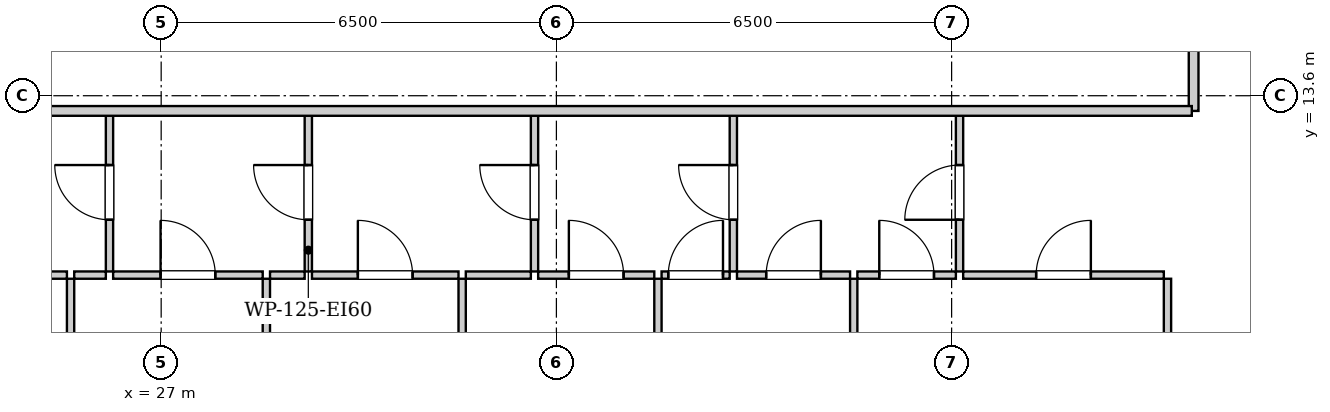
"""IFC4 building model, lengths in metres.
Left out: names, types, materials, properties, quantities, classifications, styles, units other than length and angle.
Written with IfcOpenShell. Run it as: python <this file> out.ifc"""

import sys

from ifc_helpers import new_model, si_unit, direction, frame, frame_2d, origin, place, context, subcontext, project, spatial, rectangle, extrude, element, fill, save


model = new_model("IFC4")
c1 = context("Model", 3, precision=1e-05, world=origin(), true_north=direction((0.0, 1.0)))
c2 = subcontext(c1, "Body", "Model", "MODEL_VIEW")
j1 = project(units=[si_unit("LENGTHUNIT", "METRE"), si_unit("PLANEANGLEUNIT", "RADIAN")], contexts=[c1])
p1 = place(None, origin())
s1 = spatial("IfcSite", under=j1, at=p1, CompositionType="ELEMENT")
p2 = place(p1, origin())
s2 = spatial("IfcBuilding", under=s1, at=p2, CompositionType="ELEMENT")
p3 = place(p2, frame((0.0, 0.0, 45.0)))
s3 = spatial("IfcBuildingStorey", under=s2, at=p3, CompositionType="ELEMENT", Elevation=45.0)
p4 = place(p3, frame((43.98, 13.35, 0.0), z_axis=(0.0, 0.0, 1.0), x_axis=(0.0, 1.0, 0.0)))
e1 = element("IfcWall", 1, at=p4, inside=s3, PredefinedType="PARTITIONING", context=c2, shape_type="SweptSolid", body=[
    extrude(rectangle(XDim=1.74, YDim=0.16, at=frame_2d((0.87, 0.0))), origin(), (0.0, 0.0, 1.0), 2.94),
])
p5 = place(p3, frame((26.15, 10.71, 0.0), z_axis=(0.0, 0.0, 1.0), x_axis=(0.0, 1.0, 0.0)))
e2 = element("IfcWall", 2, at=p5, inside=s3, PredefinedType="PARTITIONING", context=c2, shape_type="SweptSolid", body=[
    extrude(rectangle(XDim=2.6, YDim=0.12, at=frame_2d((1.3, 0.0))), origin(), (0.0, 0.0, 1.0), 2.94),
])
p6 = place(p5, frame((0.85, 0.0, 0.0)))
e3 = element("IfcOpeningElement", 3, at=p6, cuts=e2, PredefinedType="OPENING", context=c2, shape_type="SweptSolid", body=[
    extrude(rectangle(XDim=0.9, YDim=2.05, at=frame_2d((0.45, 1.025))), frame((0.0, 0.07, 0.0), z_axis=(0.0, -1.0, 0.0), x_axis=(1.0, 0.0, 0.0)), (0.0, 0.0, 1.0), 0.14),
])
p7 = place(p3, frame((22.35, 10.65, 0.0), z_axis=(0.0, 0.0, 1.0), x_axis=(1.0, 0.0, 0.0)))
e4 = element("IfcWall", 4, at=p7, inside=s3, PredefinedType="PARTITIONING", context=c2, shape_type="SweptSolid", body=[
    extrude(rectangle(XDim=3.1, YDim=0.12, at=frame_2d((1.55, 0.0))), origin(), (0.0, 0.0, 1.0), 2.94),
])
p8 = place(p7, frame((1.1, 0.0, 0.0)))
e5 = element("IfcOpeningElement", 5, at=p8, cuts=e4, PredefinedType="OPENING", context=c2, shape_type="SweptSolid", body=[
    extrude(rectangle(XDim=0.9, YDim=2.05, at=frame_2d((0.45, 1.025))), frame((0.0, 0.07, 0.0), z_axis=(0.0, -1.0, 0.0), x_axis=(1.0, 0.0, 0.0)), (0.0, 0.0, 1.0), 0.14),
])
p9 = place(p3, frame((25.57, 10.65, 0.0), z_axis=(0.0, 0.0, 1.0), x_axis=(1.0, 0.0, 0.0)))
e6 = element("IfcWall", 6, at=p9, inside=s3, PredefinedType="PARTITIONING", context=c2, shape_type="SweptSolid", body=[
    extrude(rectangle(XDim=0.52, YDim=0.12, at=frame_2d((0.26, 0.0))), origin(), (0.0, 0.0, 1.0), 2.94),
])
p10 = place(p3, frame((29.42, 10.71, 0.0), z_axis=(0.0, 0.0, 1.0), x_axis=(0.0, 1.0, 0.0)))
e7 = element("IfcWall", 7, at=p10, inside=s3, PredefinedType="PARTITIONING", context=c2, shape_type="SweptSolid", body=[
    extrude(rectangle(XDim=2.6, YDim=0.12, at=frame_2d((1.3, 0.0))), origin(), (0.0, 0.0, 1.0), 2.94),
])
p11 = place(p10, frame((0.85, 0.0, 0.0)))
e8 = element("IfcOpeningElement", 8, at=p11, cuts=e7, PredefinedType="OPENING", context=c2, shape_type="SweptSolid", body=[
    extrude(rectangle(XDim=0.9, YDim=2.05, at=frame_2d((0.45, 1.025))), frame((0.0, 0.07, 0.0), z_axis=(0.0, -1.0, 0.0), x_axis=(1.0, 0.0, 0.0)), (0.0, 0.0, 1.0), 0.14),
])
p12 = place(p3, frame((26.21, 10.65, 0.0), z_axis=(0.0, 0.0, 1.0), x_axis=(1.0, 0.0, 0.0)))
e9 = element("IfcWall", 9, at=p12, inside=s3, PredefinedType="PARTITIONING", context=c2, shape_type="SweptSolid", body=[
    extrude(rectangle(XDim=2.46, YDim=0.12, at=frame_2d((1.23, 0.0))), origin(), (0.0, 0.0, 1.0), 2.94),
])
p13 = place(p12, frame((0.78, 0.0, 0.0)))
e10 = element("IfcOpeningElement", 10, at=p13, cuts=e9, PredefinedType="OPENING", context=c2, shape_type="SweptSolid", body=[
    extrude(rectangle(XDim=0.9, YDim=2.05, at=frame_2d((0.45, 1.025))), frame((0.0, 0.07, 0.0), z_axis=(0.0, -1.0, 0.0), x_axis=(1.0, 0.0, 0.0)), (0.0, 0.0, 1.0), 0.14),
])
p14 = place(p3, frame((28.79, 10.65, 0.0), z_axis=(0.0, 0.0, 1.0), x_axis=(1.0, 0.0, 0.0)))
e11 = element("IfcWall", 11, at=p14, inside=s3, PredefinedType="PARTITIONING", context=c2, shape_type="SweptSolid", body=[
    extrude(rectangle(XDim=0.57, YDim=0.12, at=frame_2d((0.285, 0.0))), origin(), (0.0, 0.0, 1.0), 2.94),
])
p15 = place(p3, frame((33.14, 10.71, 0.0), z_axis=(0.0, 0.0, 1.0), x_axis=(0.0, 1.0, 0.0)))
e12 = element("IfcWall", 12, at=p15, inside=s3, PredefinedType="PARTITIONING", context=c2, shape_type="SweptSolid", body=[
    extrude(rectangle(XDim=2.6, YDim=0.12, at=frame_2d((1.3, 0.0))), origin(), (0.0, 0.0, 1.0), 2.155),
])
p16 = place(p15, frame((0.85, 0.0, 0.0)))
e13 = element("IfcOpeningElement", 13, at=p16, cuts=e12, PredefinedType="OPENING", context=c2, shape_type="SweptSolid", body=[
    extrude(rectangle(XDim=0.9, YDim=2.05, at=frame_2d((0.45, 1.025))), frame((0.0, 0.07, 0.0), z_axis=(0.0, -1.0, 0.0), x_axis=(1.0, 0.0, 0.0)), (0.0, 0.0, 1.0), 0.14),
])
p17 = place(p3, frame((29.48, 10.65, 0.0), z_axis=(0.0, 0.0, 1.0), x_axis=(1.0, 0.0, 0.0)))
e14 = element("IfcWall", 14, at=p17, inside=s3, PredefinedType="PARTITIONING", context=c2, shape_type="SweptSolid", body=[
    extrude(rectangle(XDim=2.41, YDim=0.12, at=frame_2d((1.205, 0.0))), origin(), (0.0, 0.0, 1.0), 2.94),
])
p18 = place(p17, frame((0.755, 0.0, 0.0)))
e15 = element("IfcOpeningElement", 15, at=p18, cuts=e14, PredefinedType="OPENING", context=c2, shape_type="SweptSolid", body=[
    extrude(rectangle(XDim=0.9, YDim=2.05, at=frame_2d((0.45, 1.025))), frame((0.0, 0.07, 0.0), z_axis=(0.0, -1.0, 0.0), x_axis=(1.0, 0.0, 0.0)), (0.0, 0.0, 1.0), 0.14),
])
p19 = place(p3, frame((32.01, 10.65, 0.0), z_axis=(0.0, 0.0, 1.0), x_axis=(1.0, 0.0, 0.0)))
e16 = element("IfcWall", 16, at=p19, inside=s3, PredefinedType="PARTITIONING", context=c2, shape_type="SweptSolid", body=[
    extrude(rectangle(XDim=1.07, YDim=0.12, at=frame_2d((0.535, 0.0))), origin(), (0.0, 0.0, 1.0), 2.94),
])
p20 = place(p3, frame((36.41, 10.71, 0.0), z_axis=(0.0, 0.0, 1.0), x_axis=(0.0, 1.0, 0.0)))
e17 = element("IfcWall", 17, at=p20, inside=s3, PredefinedType="PARTITIONING", context=c2, shape_type="SweptSolid", body=[
    extrude(rectangle(XDim=2.6, YDim=0.12, at=frame_2d((1.3, 0.0))), origin(), (0.0, 0.0, 1.0), 2.94),
])
p21 = place(p20, frame((0.85, 0.0, 0.0)))
e18 = element("IfcOpeningElement", 18, at=p21, cuts=e17, PredefinedType="OPENING", context=c2, shape_type="SweptSolid", body=[
    extrude(rectangle(XDim=0.9, YDim=2.05, at=frame_2d((0.45, 1.025))), frame((0.0, 0.07, 0.0), z_axis=(0.0, -1.0, 0.0), x_axis=(1.0, 0.0, 0.0)), (0.0, 0.0, 1.0), 0.14),
])
p22 = place(p3, frame((33.2, 10.65, 0.0), z_axis=(0.0, 0.0, 1.0), x_axis=(1.0, 0.0, 0.0)))
e19 = element("IfcWall", 19, at=p22, inside=s3, PredefinedType="PARTITIONING", context=c2, shape_type="SweptSolid", body=[
    extrude(rectangle(XDim=1.91, YDim=0.12, at=frame_2d((0.955, 0.0))), origin(), (0.0, 0.0, 1.0), 2.94),
])
p23 = place(p22, frame((0.505, 0.0, 0.0)))
e20 = element("IfcOpeningElement", 20, at=p23, cuts=e19, PredefinedType="OPENING", context=c2, shape_type="SweptSolid", body=[
    extrude(rectangle(XDim=0.9, YDim=2.05, at=frame_2d((0.45, 1.025))), frame((0.0, 0.07, 0.0), z_axis=(0.0, -1.0, 0.0), x_axis=(1.0, 0.0, 0.0)), (0.0, 0.0, 1.0), 0.14),
])
p24 = place(p3, frame((35.23, 10.65, 0.0), z_axis=(0.0, 0.0, 1.0), x_axis=(1.0, 0.0, 0.0)))
e21 = element("IfcWall", 21, at=p24, inside=s3, PredefinedType="PARTITIONING", context=c2, shape_type="SweptSolid", body=[
    extrude(rectangle(XDim=1.12, YDim=0.12, at=frame_2d((0.56, 0.0))), origin(), (0.0, 0.0, 1.0), 2.94),
])
p25 = place(p24, frame((0.11, 0.0, 0.0)))
e22 = element("IfcOpeningElement", 22, at=p25, cuts=e21, PredefinedType="OPENING", context=c2, shape_type="SweptSolid", body=[
    extrude(rectangle(XDim=0.9, YDim=2.05, at=frame_2d((0.45, 1.025))), frame((0.0, 0.07, 0.0), z_axis=(0.0, -1.0, 0.0), x_axis=(1.0, 0.0, 0.0)), (0.0, 0.0, 1.0), 0.14),
])
p26 = place(p3, frame((40.13, 10.71, 0.0), z_axis=(0.0, 0.0, 1.0), x_axis=(0.0, 1.0, 0.0)))
e23 = element("IfcWall", 23, at=p26, inside=s3, PredefinedType="PARTITIONING", context=c2, shape_type="SweptSolid", body=[
    extrude(rectangle(XDim=2.6, YDim=0.12, at=frame_2d((1.3, 0.0))), origin(), (0.0, 0.0, 1.0), 2.94),
])
p27 = place(p26, frame((0.85, 0.0, 0.0)))
e24 = element("IfcOpeningElement", 24, at=p27, cuts=e23, PredefinedType="OPENING", context=c2, shape_type="SweptSolid", body=[
    extrude(rectangle(XDim=0.9, YDim=2.05, at=frame_2d((0.45, 1.025))), frame((0.0, 0.07, 0.0), z_axis=(0.0, -1.0, 0.0), x_axis=(1.0, 0.0, 0.0)), (0.0, 0.0, 1.0), 0.14),
])
p28 = place(p3, frame((36.47, 10.65, 0.0), z_axis=(0.0, 0.0, 1.0), x_axis=(1.0, 0.0, 0.0)))
e25 = element("IfcWall", 25, at=p28, inside=s3, PredefinedType="PARTITIONING", context=c2, shape_type="SweptSolid", body=[
    extrude(rectangle(XDim=1.86, YDim=0.12, at=frame_2d((0.93, 0.0))), origin(), (0.0, 0.0, 1.0), 2.94),
])
p29 = place(p28, frame((0.48, 0.0, 0.0)))
e26 = element("IfcOpeningElement", 26, at=p29, cuts=e25, PredefinedType="OPENING", context=c2, shape_type="SweptSolid", body=[
    extrude(rectangle(XDim=0.9, YDim=2.05, at=frame_2d((0.45, 1.025))), frame((0.0, 0.07, 0.0), z_axis=(0.0, -1.0, 0.0), x_axis=(1.0, 0.0, 0.0)), (0.0, 0.0, 1.0), 0.14),
])
p30 = place(p3, frame((38.45, 10.65, 0.0), z_axis=(0.0, 0.0, 1.0), x_axis=(1.0, 0.0, 0.0)))
e27 = element("IfcWall", 27, at=p30, inside=s3, PredefinedType="PARTITIONING", context=c2, shape_type="SweptSolid", body=[
    extrude(rectangle(XDim=1.62, YDim=0.12, at=frame_2d((0.81, 0.0))), origin(), (0.0, 0.0, 1.0), 2.94),
])
p31 = place(p30, frame((0.36, 0.0, 0.0)))
e28 = element("IfcOpeningElement", 28, at=p31, cuts=e27, PredefinedType="OPENING", context=c2, shape_type="SweptSolid", body=[
    extrude(rectangle(XDim=0.9, YDim=2.05, at=frame_2d((0.45, 1.025))), frame((0.0, 0.07, 0.0), z_axis=(0.0, -1.0, 0.0), x_axis=(1.0, 0.0, 0.0)), (0.0, 0.0, 1.0), 0.14),
])
p32 = place(p3, frame((40.19, 10.65, 0.0), z_axis=(0.0, 0.0, 1.0), x_axis=(1.0, 0.0, 0.0)))
e29 = element("IfcWall", 29, at=p32, inside=s3, PredefinedType="PARTITIONING", context=c2, shape_type="SweptSolid", body=[
    extrude(rectangle(XDim=3.3, YDim=0.12, at=frame_2d((1.65, 0.0))), origin(), (0.0, 0.0, 1.0), 2.94),
])
p33 = place(p32, frame((1.2, 0.0, 0.0)))
e30 = element("IfcOpeningElement", 30, at=p33, cuts=e29, PredefinedType="OPENING", context=c2, shape_type="SweptSolid", body=[
    extrude(rectangle(XDim=0.9, YDim=2.05, at=frame_2d((0.45, 1.025))), frame((0.0, 0.07, 0.0), z_axis=(0.0, -1.0, 0.0), x_axis=(1.0, 0.0, 0.0)), (0.0, 0.0, 1.0), 0.14),
])
p34 = place(p3, frame((25.51, 0.28, 0.0), z_axis=(0.0, 0.0, 1.0), x_axis=(0.0, 1.0, 0.0)))
e31 = element("IfcWall", 31, at=p34, inside=s3, PredefinedType="PARTITIONING", context=c2, shape_type="SweptSolid", body=[
    extrude(rectangle(XDim=10.31, YDim=0.12, at=frame_2d((5.155, 0.0))), origin(), (0.0, 0.0, 1.0), 2.94),
])
p35 = place(p34, frame((4.69, 0.0, 0.0)))
e32 = element("IfcOpeningElement", 32, at=p35, cuts=e31, PredefinedType="OPENING", context=c2, shape_type="SweptSolid", body=[
    extrude(rectangle(XDim=0.9, YDim=2.05, at=frame_2d((0.45, 1.025))), frame((0.0, 0.07, 0.0), z_axis=(0.0, -1.0, 0.0), x_axis=(1.0, 0.0, 0.0)), (0.0, 0.0, 1.0), 0.14),
])
p36 = place(p3, frame((28.73, 0.28, 0.0), z_axis=(0.0, 0.0, 1.0), x_axis=(0.0, 1.0, 0.0)))
e33 = element("IfcWall", 33, at=p36, inside=s3, PredefinedType="PARTITIONING", context=c2, shape_type="SweptSolid", body=[
    extrude(rectangle(XDim=10.31, YDim=0.12, at=frame_2d((5.155, 0.0))), origin(), (0.0, 0.0, 1.0), 2.94),
])
p37 = place(p36, frame((4.69, 0.0, 0.0)))
e34 = element("IfcOpeningElement", 34, at=p37, cuts=e33, PredefinedType="OPENING", context=c2, shape_type="SweptSolid", body=[
    extrude(rectangle(XDim=0.9, YDim=2.05, at=frame_2d((0.45, 1.025))), frame((0.0, 0.07, 0.0), z_axis=(0.0, -1.0, 0.0), x_axis=(1.0, 0.0, 0.0)), (0.0, 0.0, 1.0), 0.14),
])
p38 = place(p3, frame((31.95, 0.28, 0.0), z_axis=(0.0, 0.0, 1.0), x_axis=(0.0, 1.0, 0.0)))
e35 = element("IfcWall", 35, at=p38, inside=s3, PredefinedType="PARTITIONING", context=c2, shape_type="SweptSolid", body=[
    extrude(rectangle(XDim=10.31, YDim=0.12, at=frame_2d((5.155, 0.0))), origin(), (0.0, 0.0, 1.0), 2.94),
])
p39 = place(p38, frame((4.69, 0.0, 0.0)))
e36 = element("IfcOpeningElement", 36, at=p39, cuts=e35, PredefinedType="OPENING", context=c2, shape_type="SweptSolid", body=[
    extrude(rectangle(XDim=0.9, YDim=2.05, at=frame_2d((0.45, 1.025))), frame((0.0, 0.07, 0.0), z_axis=(0.0, -1.0, 0.0), x_axis=(1.0, 0.0, 0.0)), (0.0, 0.0, 1.0), 0.14),
])
p40 = place(p3, frame((35.17, 0.28, 0.0), z_axis=(0.0, 0.0, 1.0), x_axis=(0.0, 1.0, 0.0)))
e37 = element("IfcWall", 37, at=p40, inside=s3, PredefinedType="PARTITIONING", context=c2, shape_type="SweptSolid", body=[
    extrude(rectangle(XDim=10.31, YDim=0.12, at=frame_2d((5.155, 0.0))), origin(), (0.0, 0.0, 1.0), 2.94),
])
p41 = place(p40, frame((4.69, 0.0, 0.0)))
e38 = element("IfcOpeningElement", 38, at=p41, cuts=e37, PredefinedType="OPENING", context=c2, shape_type="SweptSolid", body=[
    extrude(rectangle(XDim=0.9, YDim=2.05, at=frame_2d((0.45, 1.025))), frame((0.0, 0.07, 0.0), z_axis=(0.0, -1.0, 0.0), x_axis=(1.0, 0.0, 0.0)), (0.0, 0.0, 1.0), 0.14),
])
p42 = place(p3, frame((38.39, 0.28, 0.0), z_axis=(0.0, 0.0, 1.0), x_axis=(0.0, 1.0, 0.0)))
e39 = element("IfcWall", 39, at=p42, inside=s3, PredefinedType="PARTITIONING", context=c2, shape_type="SweptSolid", body=[
    extrude(rectangle(XDim=10.31, YDim=0.12, at=frame_2d((5.155, 0.0))), origin(), (0.0, 0.0, 1.0), 2.94),
])
p43 = place(p42, frame((4.69, 0.0, 0.0)))
e40 = element("IfcOpeningElement", 40, at=p43, cuts=e39, PredefinedType="OPENING", context=c2, shape_type="SweptSolid", body=[
    extrude(rectangle(XDim=0.9, YDim=2.05, at=frame_2d((0.45, 1.025))), frame((0.0, 0.07, 0.0), z_axis=(0.0, -1.0, 0.0), x_axis=(1.0, 0.0, 0.0)), (0.0, 0.0, 1.0), 0.14),
])
p44 = place(p3, frame((43.55, 0.28, 0.0), z_axis=(0.0, 0.0, 1.0), x_axis=(0.0, 1.0, 0.0)))
e41 = element("IfcWall", 41, at=p44, inside=s3, PredefinedType="PARTITIONING", context=c2, shape_type="SweptSolid", body=[
    extrude(rectangle(XDim=10.31, YDim=0.12, at=frame_2d((5.155, 0.0))), origin(), (0.0, 0.0, 1.0), 2.94),
])
p45 = place(p44, frame((4.69, 0.0, 0.0)))
e42 = element("IfcOpeningElement", 42, at=p45, cuts=e41, PredefinedType="OPENING", context=c2, shape_type="SweptSolid", body=[
    extrude(rectangle(XDim=0.9, YDim=2.05, at=frame_2d((0.45, 1.025))), frame((0.0, 0.07, 0.0), z_axis=(0.0, -1.0, 0.0), x_axis=(1.0, 0.0, 0.0)), (0.0, 0.0, 1.0), 0.14),
])
p46 = place(p3, frame((10.05, 13.35, 0.0), z_axis=(0.0, 0.0, 1.0), x_axis=(1.0, 0.0, 0.0)))
e43 = element("IfcWall", 43, at=p46, inside=s3, PredefinedType="PARTITIONING", context=c2, shape_type="SweptSolid", body=[
    extrude(rectangle(XDim=33.9, YDim=0.16, at=frame_2d((16.95, 0.0))), origin(), (0.0, 0.0, 1.0), 2.94),
])
p47 = place(p46, frame((3.8, 0.0, 0.0)))
e44 = element("IfcOpeningElement", 44, at=p47, cuts=e43, PredefinedType="OPENING", context=c2, shape_type="SweptSolid", body=[
    extrude(rectangle(XDim=0.95, YDim=2.1, at=frame_2d((0.475, 1.05))), frame((0.0, 0.09, 0.0), z_axis=(0.0, -1.0, 0.0), x_axis=(1.0, 0.0, 0.0)), (0.0, 0.0, 1.0), 0.18),
])
p48 = place(p46, frame((13.345, 0.0, 0.0)))
e45 = element("IfcOpeningElement", 45, at=p48, cuts=e43, PredefinedType="OPENING", context=c2, shape_type="SweptSolid", body=[
    extrude(rectangle(XDim=0.95, YDim=2.1, at=frame_2d((0.475, 1.05))), frame((0.0, 0.09, 0.0), z_axis=(0.0, -1.0, 0.0), x_axis=(1.0, 0.0, 0.0)), (0.0, 0.0, 1.0), 0.18),
])
p49 = place(p6, origin())
e46 = element("IfcDoor", 46, at=p49, inside=s3, OperationType="SINGLE_SWING_RIGHT", PredefinedType="DOOR", context=c2, shape_type="SweptSolid", body=[
    extrude(rectangle(XDim=0.9, YDim=2.05, at=frame_2d((0.45, 1.025))), frame((0.0, 0.025, 0.0), z_axis=(0.0, -1.0, 0.0), x_axis=(1.0, 0.0, 0.0)), (0.0, 0.0, 1.0), 0.05),
])
fill(e3, e46)
p50 = place(p11, origin())
e47 = element("IfcDoor", 47, at=p50, inside=s3, OperationType="SINGLE_SWING_RIGHT", PredefinedType="DOOR", context=c2, shape_type="SweptSolid", body=[
    extrude(rectangle(XDim=0.9, YDim=2.05, at=frame_2d((0.45, 1.025))), frame((0.0, 0.025, 0.0), z_axis=(0.0, -1.0, 0.0), x_axis=(1.0, 0.0, 0.0)), (0.0, 0.0, 1.0), 0.05),
])
fill(e8, e47)
p51 = place(p13, origin())
e48 = element("IfcDoor", 48, at=p51, inside=s3, OperationType="SINGLE_SWING_LEFT", PredefinedType="DOOR", context=c2, shape_type="SweptSolid", body=[
    extrude(rectangle(XDim=0.9, YDim=2.05, at=frame_2d((0.45, 1.025))), frame((0.0, 0.025, 0.0), z_axis=(0.0, -1.0, 0.0), x_axis=(1.0, 0.0, 0.0)), (0.0, 0.0, 1.0), 0.05),
])
fill(e10, e48)
p52 = place(p16, origin())
e49 = element("IfcDoor", 49, at=p52, inside=s3, OperationType="SINGLE_SWING_RIGHT", PredefinedType="DOOR", context=c2, shape_type="SweptSolid", body=[
    extrude(rectangle(XDim=0.9, YDim=2.05, at=frame_2d((0.45, 1.025))), frame((0.0, 0.025, 0.0), z_axis=(0.0, -1.0, 0.0), x_axis=(1.0, 0.0, 0.0)), (0.0, 0.0, 1.0), 0.05),
])
fill(e13, e49)
p53 = place(p18, origin())
e50 = element("IfcDoor", 50, at=p53, inside=s3, OperationType="SINGLE_SWING_LEFT", PredefinedType="DOOR", context=c2, shape_type="SweptSolid", body=[
    extrude(rectangle(XDim=0.9, YDim=2.05, at=frame_2d((0.45, 1.025))), frame((0.0, 0.025, 0.0), z_axis=(0.0, -1.0, 0.0), x_axis=(1.0, 0.0, 0.0)), (0.0, 0.0, 1.0), 0.05),
])
fill(e15, e50)
p54 = place(p21, origin())
e51 = element("IfcDoor", 51, at=p54, inside=s3, OperationType="SINGLE_SWING_RIGHT", PredefinedType="DOOR", context=c2, shape_type="SweptSolid", body=[
    extrude(rectangle(XDim=0.9, YDim=2.05, at=frame_2d((0.45, 1.025))), frame((0.0, 0.025, 0.0), z_axis=(0.0, -1.0, 0.0), x_axis=(1.0, 0.0, 0.0)), (0.0, 0.0, 1.0), 0.05),
])
fill(e18, e51)
p55 = place(p23, origin())
e52 = element("IfcDoor", 52, at=p55, inside=s3, OperationType="SINGLE_SWING_LEFT", PredefinedType="DOOR", context=c2, shape_type="SweptSolid", body=[
    extrude(rectangle(XDim=0.9, YDim=2.05, at=frame_2d((0.45, 1.025))), frame((0.0, 0.025, 0.0), z_axis=(0.0, -1.0, 0.0), x_axis=(1.0, 0.0, 0.0)), (0.0, 0.0, 1.0), 0.05),
])
fill(e20, e52)
p56 = place(p25, origin())
e53 = element("IfcDoor", 53, at=p56, inside=s3, OperationType="SINGLE_SWING_RIGHT", PredefinedType="DOOR", context=c2, shape_type="SweptSolid", body=[
    extrude(rectangle(XDim=0.9, YDim=2.05, at=frame_2d((0.45, 1.025))), frame((0.0, 0.025, 0.0), z_axis=(0.0, -1.0, 0.0), x_axis=(1.0, 0.0, 0.0)), (0.0, 0.0, 1.0), 0.05),
])
fill(e22, e53)
p57 = place(p27, origin())
e54 = element("IfcDoor", 54, at=p57, inside=s3, OperationType="SINGLE_SWING_LEFT", PredefinedType="DOOR", context=c2, shape_type="SweptSolid", body=[
    extrude(rectangle(XDim=0.9, YDim=2.05, at=frame_2d((0.45, 1.025))), frame((0.0, 0.025, 0.0), z_axis=(0.0, -1.0, 0.0), x_axis=(1.0, 0.0, 0.0)), (0.0, 0.0, 1.0), 0.05),
])
fill(e24, e54)
p58 = place(p29, origin())
e55 = element("IfcDoor", 55, at=p58, inside=s3, OperationType="SINGLE_SWING_RIGHT", PredefinedType="DOOR", context=c2, shape_type="SweptSolid", body=[
    extrude(rectangle(XDim=0.9, YDim=2.05, at=frame_2d((0.45, 1.025))), frame((0.0, 0.025, 0.0), z_axis=(0.0, -1.0, 0.0), x_axis=(1.0, 0.0, 0.0)), (0.0, 0.0, 1.0), 0.05),
])
fill(e26, e55)
p59 = place(p31, origin())
e56 = element("IfcDoor", 56, at=p59, inside=s3, OperationType="SINGLE_SWING_LEFT", PredefinedType="DOOR", context=c2, shape_type="SweptSolid", body=[
    extrude(rectangle(XDim=0.9, YDim=2.05, at=frame_2d((0.45, 1.025))), frame((0.0, 0.025, 0.0), z_axis=(0.0, -1.0, 0.0), x_axis=(1.0, 0.0, 0.0)), (0.0, 0.0, 1.0), 0.05),
])
fill(e28, e56)
p60 = place(p33, origin())
e57 = element("IfcDoor", 57, at=p60, inside=s3, OperationType="SINGLE_SWING_RIGHT", PredefinedType="DOOR", context=c2, shape_type="SweptSolid", body=[
    extrude(rectangle(XDim=0.9, YDim=2.05, at=frame_2d((0.45, 1.025))), frame((0.0, 0.025, 0.0), z_axis=(0.0, -1.0, 0.0), x_axis=(1.0, 0.0, 0.0)), (0.0, 0.0, 1.0), 0.05),
])
fill(e30, e57)
save(model, sys.argv[1])
